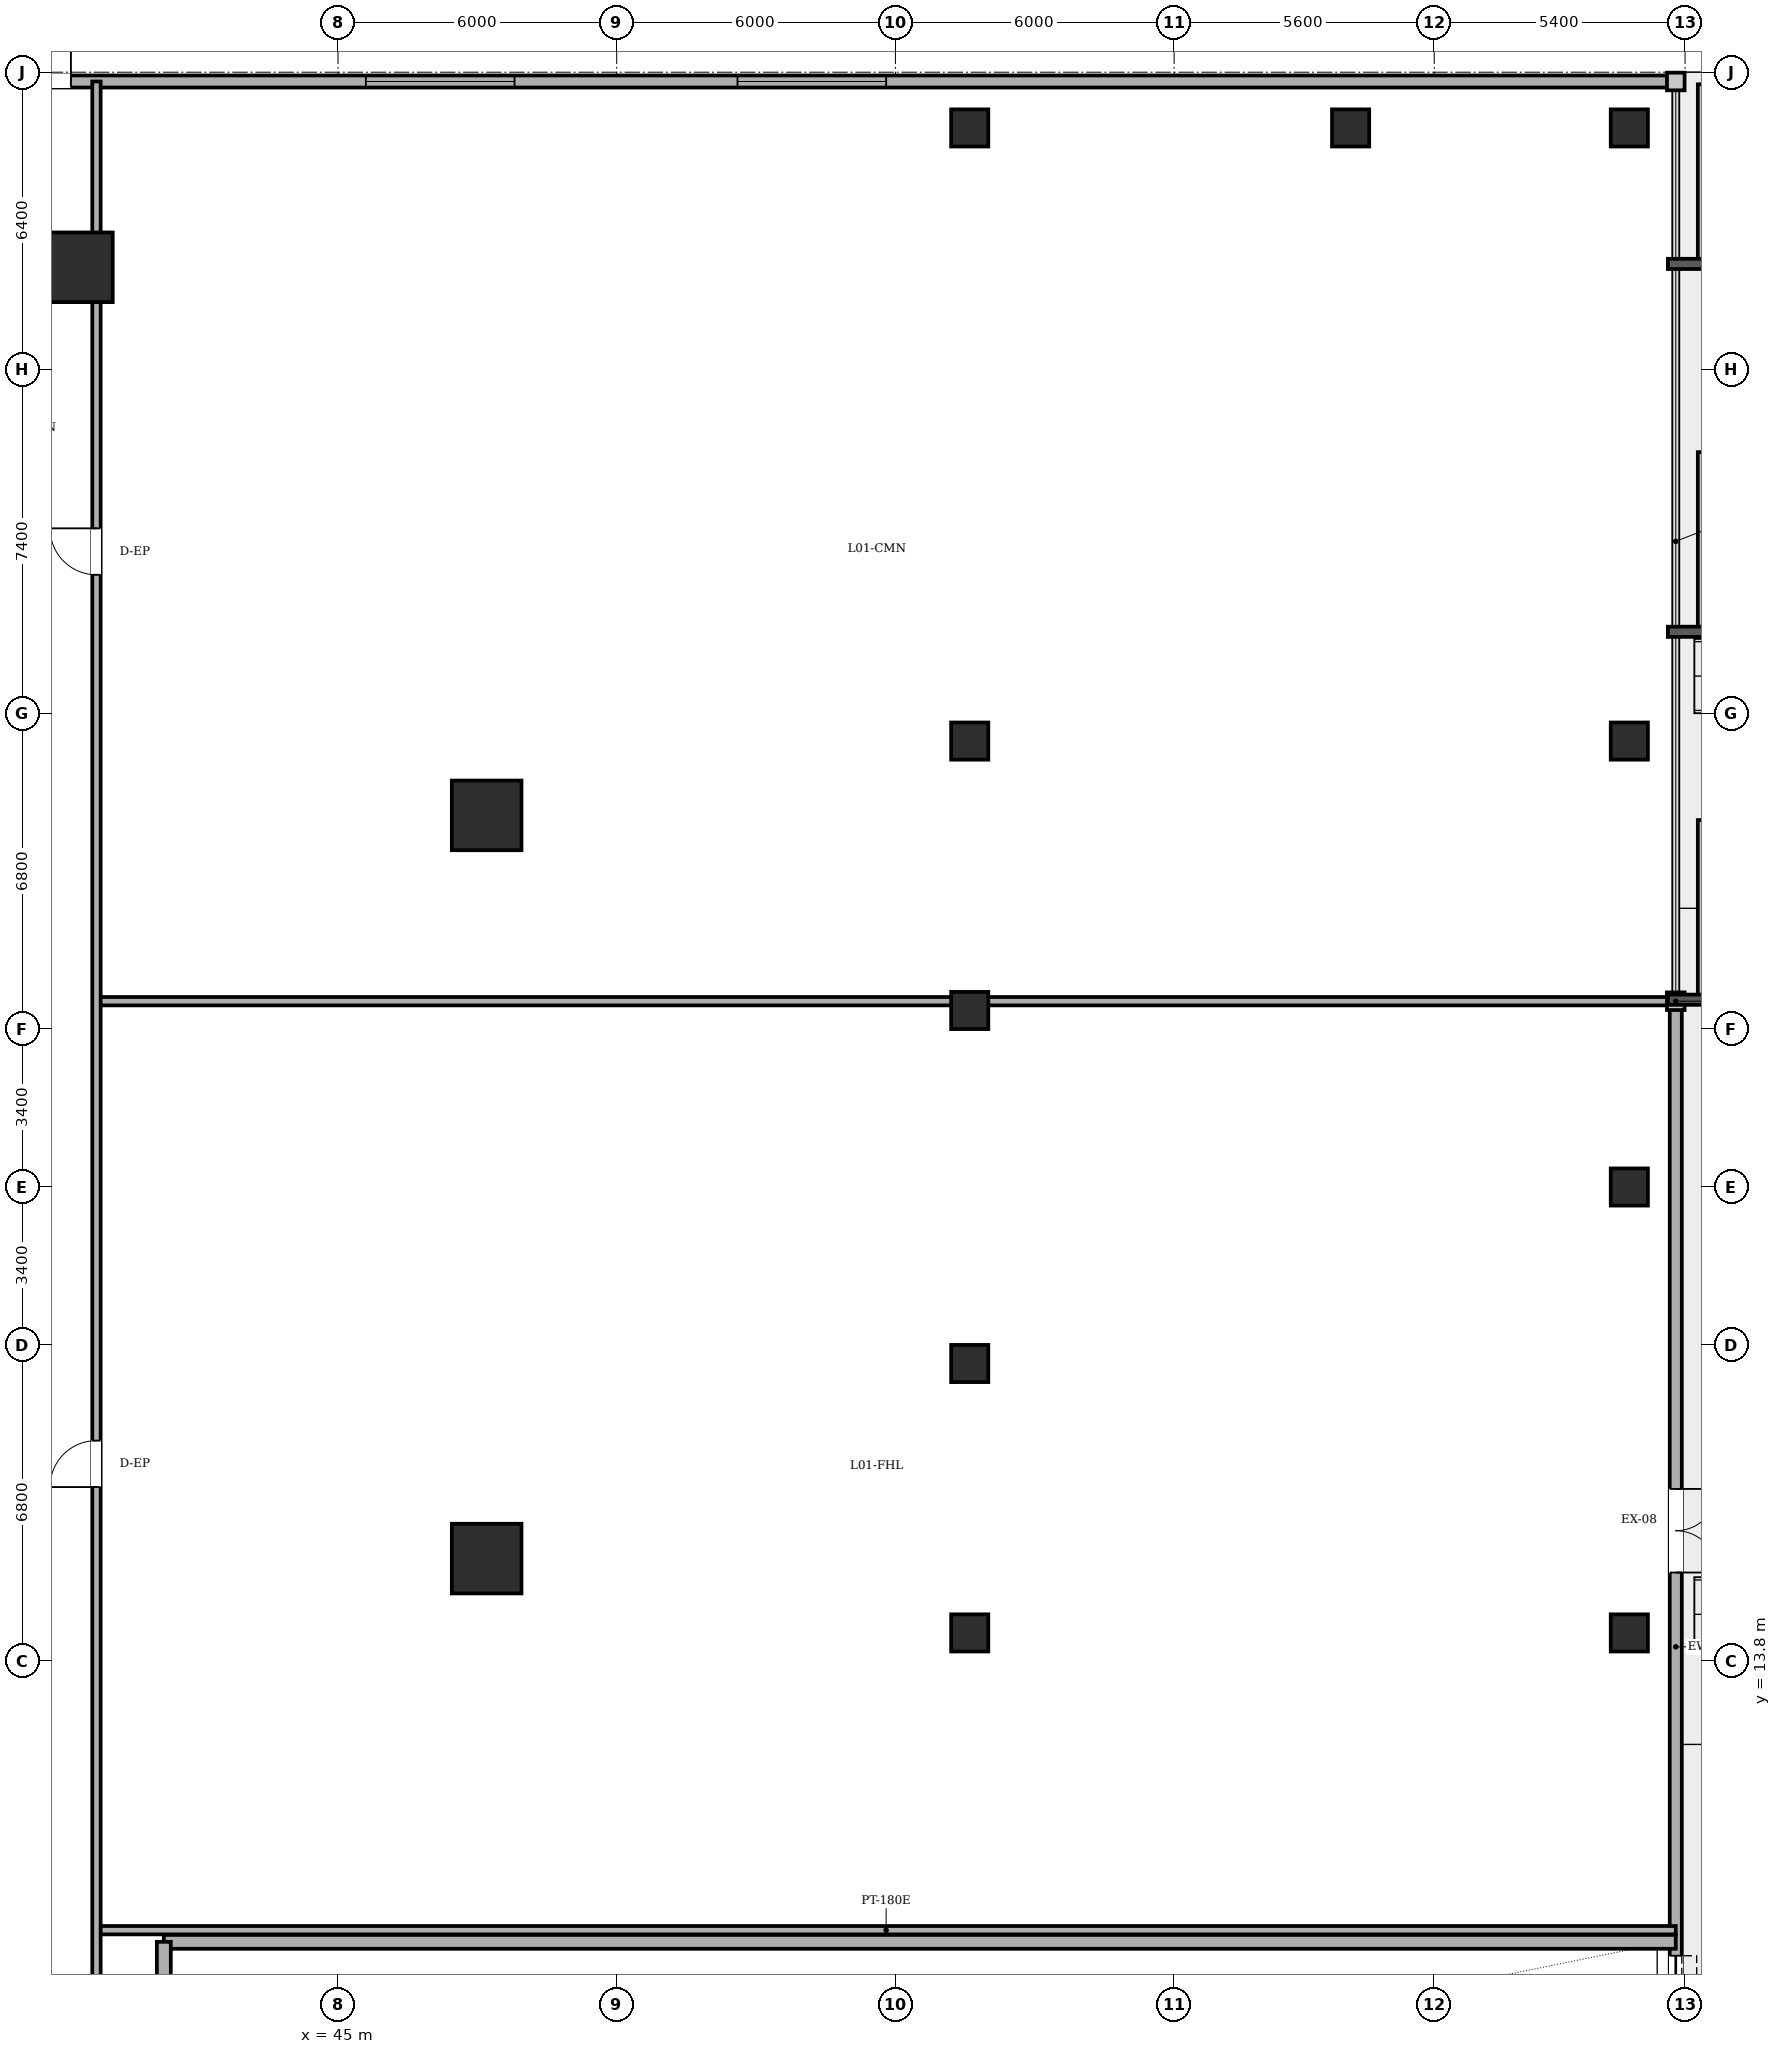
"""IFC4 building model, lengths in metres.
Left out: names, types, materials, properties, quantities, classifications, styles, units other than length and angle.
Written with IfcOpenShell. Run it as: python <this file> out.ifc"""

import sys

from ifc_helpers import new_model, si_unit, direction, frame, frame_2d, origin, origin_2d, place, context, subcontext, project, spatial, rectangle, circle, extrude, element, fill, save


model = new_model("IFC4")
c1 = context("Model", 3, precision=1e-05, world=origin(), true_north=direction((0.0, 1.0)))
c2 = subcontext(c1, "Body", "Model", "MODEL_VIEW")
j1 = project(units=[si_unit("LENGTHUNIT", "METRE"), si_unit("PLANEANGLEUNIT", "RADIAN")], contexts=[c1])
p1 = place(None, origin())
s1 = spatial("IfcSite", under=j1, at=p1, CompositionType="ELEMENT")
p2 = place(p1, origin())
s2 = spatial("IfcBuilding", under=s1, at=p2, CompositionType="ELEMENT")
p3 = place(p2, origin())
s3 = spatial("IfcBuildingStorey", under=s2, at=p3, CompositionType="ELEMENT", Elevation=0.0)
for number, where, z_axis, x_axis in (
    (1, (48.2, 16.0, 0.0), (0.0, 0.0, 1.0), (1.0, 0.0, 0.0)),
    (2, (48.2, 32.0, 0.0), (0.0, 0.0, 1.0), (1.0, 0.0, 0.0)),
    (3, (39.4, 43.8, 0.0), (0.0, 0.0, 1.0), (1.0, 0.0, 0.0)),
):
    element("IfcColumn", number, at=place(p3, frame(where, z_axis=z_axis, x_axis=x_axis)), inside=s3, PredefinedType="COLUMN", context=c2, shape_type="SweptSolid", body=[
        extrude(circle(Radius=0.75, at=origin_2d()), origin(), (0.0, 0.0, 1.0), 5.4),
    ])
for number, where, z_axis, x_axis in (
    (4, (72.8, 14.4, 0.0), (0.0, 0.0, 1.0), (1.0, 0.0, 0.0)),
    (5, (72.8, 24.0, 0.0), (0.0, 0.0, 1.0), (1.0, 0.0, 0.0)),
    (6, (72.8, 33.6, 0.0), (0.0, 0.0, 1.0), (1.0, 0.0, 0.0)),
    (7, (72.8, 46.8, 0.0), (0.0, 0.0, 1.0), (1.0, 0.0, 0.0)),
    (8, (58.6, 46.8, 0.0), (0.0, 0.0, 1.0), (1.0, 0.0, 0.0)),
    (9, (58.6, 20.2, 0.0), (0.0, 0.0, 1.0), (1.0, 0.0, 0.0)),
    (10, (58.6, 27.8, 0.0), (0.0, 0.0, 1.0), (1.0, 0.0, 0.0)),
    (11, (58.6, 14.4, 0.0), (0.0, 0.0, 1.0), (1.0, 0.0, 0.0)),
    (12, (58.6, 33.6, 0.0), (0.0, 0.0, 1.0), (1.0, 0.0, 0.0)),
    (13, (66.8, 46.8, 0.0), (0.0, 0.0, 1.0), (1.0, 0.0, 0.0)),
):
    element("IfcColumn", number, at=place(p3, frame(where, z_axis=z_axis, x_axis=x_axis)), inside=s3, PredefinedType="COLUMN", context=c2, shape_type="SweptSolid", body=[
        extrude(rectangle(XDim=0.8, YDim=0.8, at=origin_2d()), origin(), (0.0, 0.0, 1.0), 5.4),
    ])
p4 = place(p3, frame((1.6, 47.8, 0.0), z_axis=(0.0, 0.0, 1.0), x_axis=(1.0, 0.0, 0.0)))
e14 = element("IfcWall", 14, at=p4, inside=s3, PredefinedType="SOLIDWALL", context=c2, shape_type="SweptSolid", body=[
    extrude(rectangle(XDim=72.2, YDim=0.26, at=frame_2d((36.1, 0.0))), origin(), (0.0, 0.0, 1.0), 5.18),
])
p5 = place(p4, frame((16.95, 0.0, 0.0)))
e15 = element("IfcOpeningElement", 15, at=p5, cuts=e14, PredefinedType="OPENING", context=c2, shape_type="SweptSolid", body=[
    extrude(rectangle(XDim=1.8, YDim=2.4, at=frame_2d((0.9, 1.2))), frame((0.0, 0.14, 0.0), z_axis=(0.0, -1.0, 0.0), x_axis=(1.0, 0.0, 0.0)), (0.0, 0.0, 1.0), 0.28),
])
p6 = place(p4, frame((35.85, 0.0, 0.0)))
e16 = element("IfcOpeningElement", 16, at=p6, cuts=e14, PredefinedType="OPENING", context=c2, shape_type="SweptSolid", body=[
    extrude(rectangle(XDim=1.8, YDim=2.4, at=frame_2d((0.9, 1.2))), frame((0.0, 0.14, 0.0), z_axis=(0.0, -1.0, 0.0), x_axis=(1.0, 0.0, 0.0)), (0.0, 0.0, 1.0), 0.28),
])
p7 = place(p4, frame((6.0, 0.0, 0.9)))
e17 = element("IfcOpeningElement", 17, at=p7, cuts=e14, PredefinedType="OPENING", context=c2, shape_type="SweptSolid", body=[
    extrude(rectangle(XDim=3.2, YDim=2.8, at=frame_2d((1.6, 1.4))), frame((0.0, 0.14, 0.0), z_axis=(0.0, -1.0, 0.0), x_axis=(1.0, 0.0, 0.0)), (0.0, 0.0, 1.0), 0.28),
])
p8 = place(p4, frame((12.0, 0.0, 0.9)))
e18 = element("IfcOpeningElement", 18, at=p8, cuts=e14, PredefinedType="OPENING", context=c2, shape_type="SweptSolid", body=[
    extrude(rectangle(XDim=3.2, YDim=2.8, at=frame_2d((1.6, 1.4))), frame((0.0, 0.14, 0.0), z_axis=(0.0, -1.0, 0.0), x_axis=(1.0, 0.0, 0.0)), (0.0, 0.0, 1.0), 0.28),
])
p9 = place(p4, frame((44.0, 0.0, 0.9)))
e19 = element("IfcOpeningElement", 19, at=p9, cuts=e14, PredefinedType="OPENING", context=c2, shape_type="SweptSolid", body=[
    extrude(rectangle(XDim=3.2, YDim=2.8, at=frame_2d((1.6, 1.4))), frame((0.0, 0.14, 0.0), z_axis=(0.0, -1.0, 0.0), x_axis=(1.0, 0.0, 0.0)), (0.0, 0.0, 1.0), 0.28),
])
p10 = place(p4, frame((52.0, 0.0, 0.9)))
e20 = element("IfcOpeningElement", 20, at=p10, cuts=e14, PredefinedType="OPENING", context=c2, shape_type="SweptSolid", body=[
    extrude(rectangle(XDim=3.2, YDim=2.8, at=frame_2d((1.6, 1.4))), frame((0.0, 0.14, 0.0), z_axis=(0.0, -1.0, 0.0), x_axis=(1.0, 0.0, 0.0)), (0.0, 0.0, 1.0), 0.28),
])
p11 = place(p3, frame((73.8, 28.0, 0.0), z_axis=(0.0, 0.0, 1.0), x_axis=(0.0, -1.0, 0.0)))
e21 = element("IfcWall", 21, at=p11, inside=s3, PredefinedType="SOLIDWALL", context=c2, shape_type="SweptSolid", body=[
    extrude(rectangle(XDim=27.8, YDim=0.26, at=frame_2d((13.9, 0.0))), origin(), (0.0, 0.0, 1.0), 5.18),
])
p12 = place(p11, frame((20.55, 0.0, 0.0)))
e22 = element("IfcOpeningElement", 22, at=p12, cuts=e21, PredefinedType="OPENING", context=c2, shape_type="SweptSolid", body=[
    extrude(rectangle(XDim=6.0, YDim=2.8, at=frame_2d((3.0, 1.4))), frame((0.0, 0.14, 0.0), z_axis=(0.0, -1.0, 0.0), x_axis=(1.0, 0.0, 0.0)), (0.0, 0.0, 1.0), 0.28),
])
p13 = place(p11, frame((10.5, 0.0, 0.0)))
e23 = element("IfcOpeningElement", 23, at=p13, cuts=e21, PredefinedType="OPENING", context=c2, shape_type="SweptSolid", body=[
    extrude(rectangle(XDim=1.8, YDim=2.4, at=frame_2d((0.9, 1.2))), frame((0.0, 0.14, 0.0), z_axis=(0.0, -1.0, 0.0), x_axis=(1.0, 0.0, 0.0)), (0.0, 0.0, 1.0), 0.28),
])
p14 = place(p3, frame((41.25, 7.75, 0.0), z_axis=(0.0, 0.0, 1.0), x_axis=(1.0, 0.0, 0.0)))
e24 = element("IfcWall", 24, at=p14, inside=s3, PredefinedType="SOLIDWALL", context=c2, shape_type="SweptSolid", body=[
    extrude(rectangle(XDim=32.55, YDim=0.3, at=frame_2d((16.275, 0.0))), origin(), (0.0, 0.0, 1.0), 5.18),
])
p15 = place(p3, frame((41.25, 1.15, 0.0), z_axis=(0.0, 0.0, 1.0), x_axis=(0.0, 1.0, 0.0)))
e25 = element("IfcWall", 25, at=p15, inside=s3, PredefinedType="SOLIDWALL", context=c2, shape_type="SweptSolid", body=[
    extrude(rectangle(XDim=6.6, YDim=0.3, at=frame_2d((3.3, 0.0))), origin(), (0.0, 0.0, 1.0), 5.18),
])
p16 = place(p3, frame((39.8, 8.0, 0.0), z_axis=(0.0, 0.0, 1.0), x_axis=(1.0, 0.0, 0.0)))
e26 = element("IfcWall", 26, at=p16, inside=s3, PredefinedType="PARTITIONING", context=c2, shape_type="SweptSolid", body=[
    extrude(rectangle(XDim=34.0, YDim=0.18, at=frame_2d((17.0, 0.0))), origin(), (0.0, 0.0, 1.0), 5.18),
])
p17 = place(p3, frame((39.8, 28.0, 0.0), z_axis=(0.0, 0.0, 1.0), x_axis=(1.0, 0.0, 0.0)))
e27 = element("IfcWall", 27, at=p17, inside=s3, PredefinedType="PARTITIONING", context=c2, shape_type="SweptSolid", body=[
    extrude(rectangle(XDim=34.0, YDim=0.18, at=frame_2d((17.0, 0.0))), origin(), (0.0, 0.0, 1.0), 4.362),
])
p18 = place(p3, frame((39.8, 0.2, 0.0), z_axis=(0.0, 0.0, 1.0), x_axis=(0.0, 1.0, 0.0)))
e28 = element("IfcWall", 28, at=p18, inside=s3, PredefinedType="PARTITIONING", context=c2, shape_type="SweptSolid", body=[
    extrude(rectangle(XDim=47.6, YDim=0.18, at=frame_2d((23.8, 0.0))), origin(), (0.0, 0.0, 1.0), 5.18),
])
p19 = place(p18, frame((17.34, 0.0, 0.0)))
e29 = element("IfcOpeningElement", 29, at=p19, cuts=e28, PredefinedType="OPENING", context=c2, shape_type="SweptSolid", body=[
    extrude(rectangle(XDim=1.0, YDim=2.15, at=frame_2d((0.5, 1.075))), frame((0.0, 0.1, 0.0), z_axis=(0.0, -1.0, 0.0), x_axis=(1.0, 0.0, 0.0)), (0.0, 0.0, 1.0), 0.2),
])
p20 = place(p18, frame((36.98, 0.0, 0.0)))
e30 = element("IfcOpeningElement", 30, at=p20, cuts=e28, PredefinedType="OPENING", context=c2, shape_type="SweptSolid", body=[
    extrude(rectangle(XDim=1.0, YDim=2.15, at=frame_2d((0.5, 1.075))), frame((0.0, 0.1, 0.0), z_axis=(0.0, -1.0, 0.0), x_axis=(1.0, 0.0, 0.0)), (0.0, 0.0, 1.0), 0.2),
])
p21 = place(p12, origin())
e31 = element("IfcDoor", 31, at=p21, inside=s3, OperationType="ROLLINGUP", PredefinedType="GATE", context=c2, shape_type="SweptSolid", body=[
    extrude(rectangle(XDim=6.0, YDim=2.8, at=frame_2d((3.0, 1.4))), frame((0.0, 0.025, 0.0), z_axis=(0.0, -1.0, 0.0), x_axis=(1.0, 0.0, 0.0)), (0.0, 0.0, 1.0), 0.05),
])
fill(e22, e31)
p22 = place(p6, origin())
e32 = element("IfcDoor", 32, at=p22, inside=s3, OperationType="DOUBLE_DOOR_SINGLE_SWING", PredefinedType="DOOR", context=c2, shape_type="SweptSolid", body=[
    extrude(rectangle(XDim=1.8, YDim=2.4, at=frame_2d((0.9, 1.2))), frame((0.0, 0.025, 0.0), z_axis=(0.0, -1.0, 0.0), x_axis=(1.0, 0.0, 0.0)), (0.0, 0.0, 1.0), 0.05),
])
fill(e16, e32)
p23 = place(p13, origin())
e33 = element("IfcDoor", 33, at=p23, inside=s3, OperationType="DOUBLE_DOOR_SINGLE_SWING", PredefinedType="DOOR", context=c2, shape_type="SweptSolid", body=[
    extrude(rectangle(XDim=1.8, YDim=2.4, at=frame_2d((0.9, 1.2))), frame((0.0, 0.025, 0.0), z_axis=(0.0, -1.0, 0.0), x_axis=(1.0, 0.0, 0.0)), (0.0, 0.0, 1.0), 0.05),
])
fill(e23, e33)
p24 = place(p9, origin())
e34 = element("IfcWindow", 34, at=p24, inside=s3, PartitioningType="TRIPLE_PANEL_VERTICAL", PredefinedType="WINDOW", context=c2, shape_type="SweptSolid", body=[
    extrude(rectangle(XDim=3.2, YDim=2.8, at=frame_2d((1.6, 1.4))), frame((0.0, 0.03, 0.0), z_axis=(0.0, -1.0, 0.0), x_axis=(1.0, 0.0, 0.0)), (0.0, 0.0, 1.0), 0.06),
])
fill(e19, e34)
p25 = place(p10, origin())
e35 = element("IfcWindow", 35, at=p25, inside=s3, PartitioningType="TRIPLE_PANEL_VERTICAL", PredefinedType="WINDOW", context=c2, shape_type="SweptSolid", body=[
    extrude(rectangle(XDim=3.2, YDim=2.8, at=frame_2d((1.6, 1.4))), frame((0.0, 0.03, 0.0), z_axis=(0.0, -1.0, 0.0), x_axis=(1.0, 0.0, 0.0)), (0.0, 0.0, 1.0), 0.06),
])
fill(e20, e35)
p26 = place(p19, origin())
e36 = element("IfcDoor", 36, at=p26, inside=s3, OperationType="SINGLE_SWING_LEFT", PredefinedType="DOOR", context=c2, shape_type="SweptSolid", body=[
    extrude(rectangle(XDim=1.0, YDim=2.15, at=frame_2d((0.5, 1.075))), frame((0.0, 0.025, 0.0), z_axis=(0.0, -1.0, 0.0), x_axis=(1.0, 0.0, 0.0)), (0.0, 0.0, 1.0), 0.05),
])
fill(e29, e36)
p27 = place(p20, origin())
e37 = element("IfcDoor", 37, at=p27, inside=s3, OperationType="SINGLE_SWING_RIGHT", PredefinedType="DOOR", context=c2, shape_type="SweptSolid", body=[
    extrude(rectangle(XDim=1.0, YDim=2.15, at=frame_2d((0.5, 1.075))), frame((0.0, 0.025, 0.0), z_axis=(0.0, -1.0, 0.0), x_axis=(1.0, 0.0, 0.0)), (0.0, 0.0, 1.0), 0.05),
])
fill(e30, e37)
save(model, sys.argv[1])
